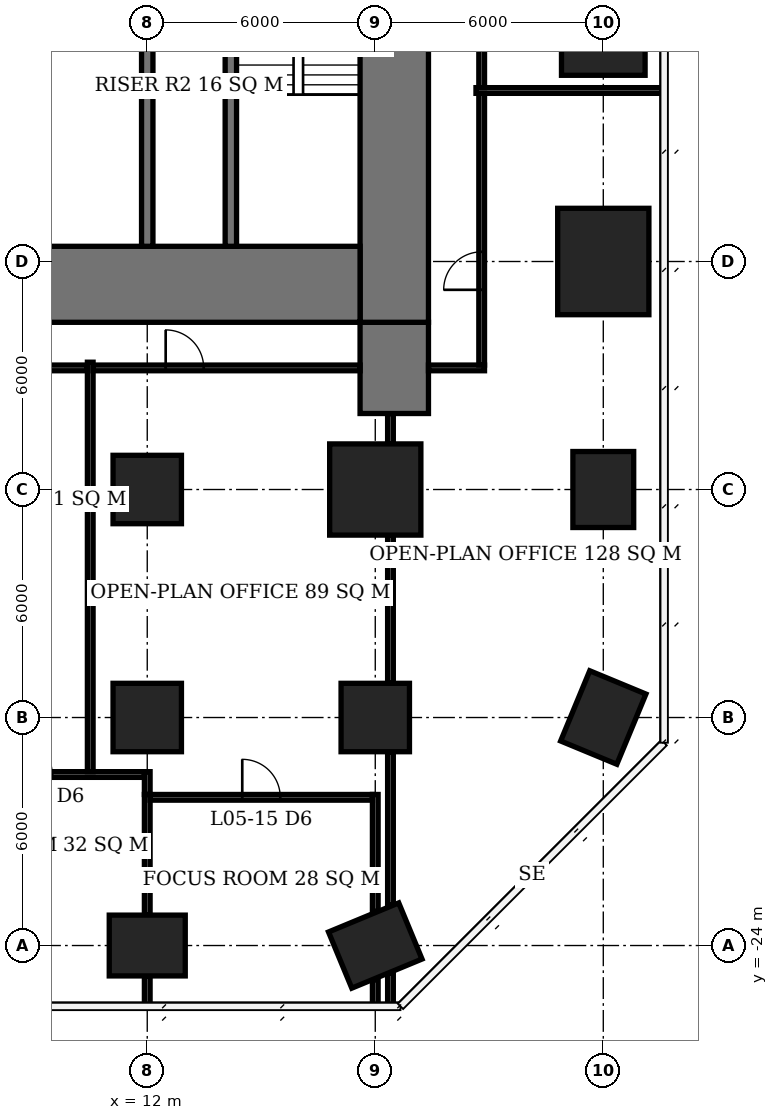
"""IFC4 building model, lengths in metres.
Left out: names, types, materials, properties, quantities, classifications, styles, units other than length and angle.
Written with IfcOpenShell. Run it as: python <this file> out.ifc"""

import sys

from ifc_helpers import new_model, si_unit, direction, frame, frame_2d, origin, origin_2d, place, context, subcontext, project, spatial, rectangle, extrude, element, fill, save


model = new_model("IFC4")
c1 = context("Model", 3, precision=1e-05, world=origin(), true_north=direction((0.0, 1.0)))
c2 = subcontext(c1, "Body", "Model", "MODEL_VIEW")
j1 = project(units=[si_unit("LENGTHUNIT", "METRE"), si_unit("PLANEANGLEUNIT", "RADIAN")], contexts=[c1])
p1 = place(None, origin())
s1 = spatial("IfcSite", under=j1, at=p1, CompositionType="ELEMENT")
p2 = place(p1, origin())
s2 = spatial("IfcBuilding", under=s1, at=p2, CompositionType="ELEMENT")
p3 = place(p2, frame((0.0, 0.0, 26.0)))
s3 = spatial("IfcBuildingStorey", under=s2, at=p3, CompositionType="ELEMENT", Elevation=26.0)
p4 = place(p3, frame((12.0, -24.0, 0.0), z_axis=(0.0, 0.0, 1.0), x_axis=(1.0, 0.0, 0.0)))
e1 = element("IfcColumn", 1, at=p4, inside=s3, PredefinedType="COLUMN", context=c2, shape_type="SweptSolid", body=[
    extrude(rectangle(XDim=2.0, YDim=1.6, at=origin_2d()), origin(), (0.0, 0.0, 1.0), 3.9),
])
for number, where, z_axis, x_axis in (
    (2, (12.0, -18.0, 0.0), (0.0, 0.0, 1.0), (1.0, 0.0, 0.0)),
    (3, (12.0, -12.0, 0.0), (0.0, 0.0, 1.0), (1.0, 0.0, 0.0)),
):
    element("IfcColumn", number, at=place(p3, frame(where, z_axis=z_axis, x_axis=x_axis)), inside=s3, PredefinedType="COLUMN", context=c2, shape_type="SweptSolid", body=[
        extrude(rectangle(XDim=1.8, YDim=1.8, at=origin_2d()), origin(), (0.0, 0.0, 1.0), 3.9),
    ])
p5 = place(p3, frame((18.0, -24.0, 0.0), z_axis=(0.0, 0.0, 1.0), x_axis=(-0.923879532511, -0.382683432365, 0.0)))
e4 = element("IfcColumn", 4, at=p5, inside=s3, PredefinedType="COLUMN", context=c2, shape_type="SweptSolid", body=[
    extrude(rectangle(XDim=2.0, YDim=1.6, at=origin_2d()), origin(), (0.0, 0.0, 1.0), 3.9),
])
p6 = place(p3, frame((18.0, -18.0, 0.0), z_axis=(0.0, 0.0, 1.0), x_axis=(1.0, 0.0, 0.0)))
e5 = element("IfcColumn", 5, at=p6, inside=s3, PredefinedType="COLUMN", context=c2, shape_type="SweptSolid", body=[
    extrude(rectangle(XDim=1.8, YDim=1.8, at=origin_2d()), origin(), (0.0, 0.0, 1.0), 3.9),
])
p7 = place(p3, frame((18.0, -12.0, 0.0), z_axis=(0.0, 0.0, 1.0), x_axis=(1.0, 0.0, 0.0)))
e6 = element("IfcColumn", 6, at=p7, inside=s3, PredefinedType="COLUMN", context=c2, shape_type="SweptSolid", body=[
    extrude(rectangle(XDim=2.4, YDim=2.4, at=origin_2d()), origin(), (0.0, 0.0, 1.0), 3.9),
])
for number, where, z_axis, x_axis in (
    (7, (24.0, -18.0, 0.0), (0.0, 0.0, 1.0), (-0.383, -0.924, 0.0)),
    (8, (24.0, -12.0, 0.0), (0.0, 0.0, 1.0), (0.0, 1.0, 0.0)),
):
    element("IfcColumn", number, at=place(p3, frame(where, z_axis=z_axis, x_axis=x_axis)), inside=s3, PredefinedType="COLUMN", context=c2, shape_type="SweptSolid", body=[
        extrude(rectangle(XDim=2.0, YDim=1.6, at=origin_2d()), origin(), (0.0, 0.0, 1.0), 3.9),
    ])
p8 = place(p3, frame((24.0, -6.0, 0.0), z_axis=(0.0, 0.0, 1.0), x_axis=(0.0, 1.0, 0.0)))
e9 = element("IfcColumn", 9, at=p8, inside=s3, PredefinedType="COLUMN", context=c2, shape_type="SweptSolid", body=[
    extrude(rectangle(XDim=2.8, YDim=2.4, at=origin_2d()), origin(), (0.0, 0.0, 1.0), 3.9),
])
p9 = place(p3, frame((24.0, 0.0, 0.0), z_axis=(0.0, 0.0, 1.0), x_axis=(1.0, 0.0, 0.0)))
e10 = element("IfcColumn", 10, at=p9, inside=s3, PredefinedType="COLUMN", context=c2, shape_type="SweptSolid", body=[
    extrude(rectangle(XDim=2.2, YDim=2.2, at=origin_2d()), origin(), (0.0, 0.0, 1.0), 3.9),
])
p10 = place(p3, frame((-5.6, -6.6, 0.0), z_axis=(0.0, 0.0, 1.0), x_axis=(1.0, 0.0, 0.0)))
e11 = element("IfcWall", 11, at=p10, inside=s3, PredefinedType="SHEAR", context=c2, shape_type="SweptSolid", body=[
    extrude(rectangle(XDim=23.2, YDim=2.0, at=frame_2d((11.6, 0.0))), origin(), (0.0, 0.0, 1.0), 3.9),
])
p11 = place(p3, frame((18.5, -7.6, 0.0), z_axis=(0.0, 0.0, 1.0), x_axis=(0.0, 1.0, 0.0)))
e12 = element("IfcWall", 12, at=p11, inside=s3, PredefinedType="SHEAR", context=c2, shape_type="SweptSolid", body=[
    extrude(rectangle(XDim=21.2, YDim=1.8, at=frame_2d((10.6, 0.0))), origin(), (0.0, 0.0, 1.0), 3.9),
])
p12 = place(p11, frame((9.2, 0.0, 0.0)))
e13 = element("IfcOpeningElement", 13, at=p12, cuts=e12, PredefinedType="OPENING", context=c2, shape_type="SweptSolid", body=[
    extrude(rectangle(XDim=1.8, YDim=2.4, at=frame_2d((0.9, 1.2))), frame((0.0, 0.91, 0.0), z_axis=(0.0, -1.0, 0.0), x_axis=(1.0, 0.0, 0.0)), (0.0, 0.0, 1.0), 1.82),
])
p13 = place(p3, frame((18.5, -10.0, 0.0), z_axis=(0.0, 0.0, 1.0), x_axis=(0.0, 1.0, 0.0)))
e14 = element("IfcWall", 14, at=p13, inside=s3, PredefinedType="SHEAR", context=c2, shape_type="SweptSolid", body=[
    extrude(rectangle(XDim=2.4, YDim=1.8, at=frame_2d((1.2, 0.0))), origin(), (0.0, 0.0, 1.0), 3.9),
])
p14 = place(p3, frame((12.0, -5.6, 0.0), z_axis=(0.0, 0.0, 1.0), x_axis=(0.0, 1.0, 0.0)))
e15 = element("IfcWall", 15, at=p14, inside=s3, PredefinedType="SHEAR", context=c2, shape_type="SweptSolid", body=[
    extrude(rectangle(XDim=5.45, YDim=0.3, at=frame_2d((2.725, 0.0))), origin(), (0.0, 0.0, 1.0), 3.9),
])
p15 = place(p3, frame((14.2, -5.6, 0.0), z_axis=(0.0, 0.0, 1.0), x_axis=(0.0, 1.0, 0.0)))
e16 = element("IfcWall", 16, at=p15, inside=s3, PredefinedType="SHEAR", context=c2, shape_type="SweptSolid", body=[
    extrude(rectangle(XDim=8.45, YDim=0.3, at=frame_2d((4.225, 0.0))), origin(), (0.0, 0.0, 1.0), 3.9),
])
p16 = place(p3, frame((12.075, -20.1, 0.0), z_axis=(0.0, 0.0, 1.0), x_axis=(1.0, 0.0, 0.0)))
e17 = element("IfcWall", 17, at=p16, inside=s3, PredefinedType="PARTITIONING", context=c2, shape_type="SweptSolid", body=[
    extrude(rectangle(XDim=5.85, YDim=0.15, at=frame_2d((2.925, 0.0))), origin(), (0.0, 0.0, 1.0), 3.65),
])
p17 = place(p16, frame((2.425, 0.0, 0.0)))
e18 = element("IfcOpeningElement", 18, at=p17, cuts=e17, PredefinedType="OPENING", context=c2, shape_type="SweptSolid", body=[
    extrude(rectangle(XDim=1.0, YDim=2.1, at=frame_2d((0.5, 1.05))), frame((0.0, 0.085, 0.0), z_axis=(0.0, -1.0, 0.0), x_axis=(1.0, 0.0, 0.0)), (0.0, 0.0, 1.0), 0.17),
])
p18 = place(p3, frame((6.075, -19.5, 0.0), z_axis=(0.0, 0.0, 1.0), x_axis=(1.0, 0.0, 0.0)))
e19 = element("IfcWall", 19, at=p18, inside=s3, PredefinedType="PARTITIONING", context=c2, shape_type="SweptSolid", body=[
    extrude(rectangle(XDim=5.85, YDim=0.15, at=frame_2d((2.925, 0.0))), origin(), (0.0, 0.0, 1.0), 3.65),
])
p19 = place(p18, frame((2.425, 0.0, 0.0)))
e20 = element("IfcOpeningElement", 20, at=p19, cuts=e19, PredefinedType="OPENING", context=c2, shape_type="SweptSolid", body=[
    extrude(rectangle(XDim=1.0, YDim=2.1, at=frame_2d((0.5, 1.05))), frame((0.0, 0.085, 0.0), z_axis=(0.0, -1.0, 0.0), x_axis=(1.0, 0.0, 0.0)), (0.0, 0.0, 1.0), 0.17),
])
p20 = place(p3, frame((12.0, -25.6, 0.0), z_axis=(0.0, 0.0, 1.0), x_axis=(0.0, 1.0, 0.0)))
e21 = element("IfcWall", 21, at=p20, inside=s3, PredefinedType="PARTITIONING", context=c2, shape_type="SweptSolid", body=[
    extrude(rectangle(XDim=0.8, YDim=0.15, at=frame_2d((0.4, 0.0))), origin(), (0.0, 0.0, 1.0), 3.65),
])
p21 = place(p3, frame((12.0, -23.2, 0.0), z_axis=(0.0, 0.0, 1.0), x_axis=(0.0, 1.0, 0.0)))
e22 = element("IfcWall", 22, at=p21, inside=s3, PredefinedType="PARTITIONING", context=c2, shape_type="SweptSolid", body=[
    extrude(rectangle(XDim=3.175, YDim=0.15, at=frame_2d((1.587, 0.0))), origin(), (0.0, 0.0, 1.0), 3.65),
])
p22 = place(p3, frame((12.0, -20.025, 0.0), z_axis=(0.0, 0.0, 1.0), x_axis=(0.0, 1.0, 0.0)))
e23 = element("IfcWall", 23, at=p22, inside=s3, PredefinedType="PARTITIONING", context=c2, shape_type="SweptSolid", body=[
    extrude(rectangle(XDim=0.6, YDim=0.15, at=frame_2d((0.3, 0.0))), origin(), (0.0, 0.0, 1.0), 3.65),
])
p23 = place(p3, frame((18.0, -25.6, 0.0), z_axis=(0.0, 0.0, 1.0), x_axis=(0.0, 1.0, 0.0)))
e24 = element("IfcWall", 24, at=p23, inside=s3, PredefinedType="PARTITIONING", context=c2, shape_type="SweptSolid", body=[
    extrude(rectangle(XDim=0.703, YDim=0.15, at=frame_2d((0.352, 0.0))), origin(), (0.0, 0.0, 1.0), 3.65),
])
p24 = place(p3, frame((18.0, -23.103, 0.0), z_axis=(0.0, 0.0, 1.0), x_axis=(0.0, 1.0, 0.0)))
e25 = element("IfcWall", 25, at=p24, inside=s3, PredefinedType="PARTITIONING", context=c2, shape_type="SweptSolid", body=[
    extrude(rectangle(XDim=3.078, YDim=0.15, at=frame_2d((1.539, 0.0))), origin(), (0.0, 0.0, 1.0), 3.65),
])
p25 = place(p3, frame((4.575, -8.8, 0.0), z_axis=(0.0, 0.0, 1.0), x_axis=(1.0, 0.0, 0.0)))
e26 = element("IfcWall", 26, at=p25, inside=s3, PredefinedType="PARTITIONING", context=c2, shape_type="SweptSolid", body=[
    extrude(rectangle(XDim=5.85, YDim=0.15, at=frame_2d((2.925, 0.0))), origin(), (0.0, 0.0, 1.0), 3.65),
])
p26 = place(p25, frame((1.525, 0.0, 0.0)))
e27 = element("IfcOpeningElement", 27, at=p26, cuts=e26, PredefinedType="OPENING", context=c2, shape_type="SweptSolid", body=[
    extrude(rectangle(XDim=1.0, YDim=2.1, at=frame_2d((0.5, 1.05))), frame((0.0, 0.085, 0.0), z_axis=(0.0, -1.0, 0.0), x_axis=(1.0, 0.0, 0.0)), (0.0, 0.0, 1.0), 0.17),
])
p27 = place(p3, frame((10.5, -19.425, 0.0), z_axis=(0.0, 0.0, 1.0), x_axis=(0.0, 1.0, 0.0)))
e28 = element("IfcWall", 28, at=p27, inside=s3, PredefinedType="PARTITIONING", context=c2, shape_type="SweptSolid", body=[
    extrude(rectangle(XDim=10.775, YDim=0.15, at=frame_2d((5.388, 0.0))), origin(), (0.0, 0.0, 1.0), 3.65),
])
p28 = place(p3, frame((10.575, -8.8, 0.0), z_axis=(0.0, 0.0, 1.0), x_axis=(1.0, 0.0, 0.0)))
e29 = element("IfcWall", 29, at=p28, inside=s3, PredefinedType="PARTITIONING", context=c2, shape_type="SweptSolid", body=[
    extrude(rectangle(XDim=7.025, YDim=0.15, at=frame_2d((3.513, 0.0))), origin(), (0.0, 0.0, 1.0), 3.65),
])
p29 = place(p28, frame((1.91, 0.0, 0.0)))
e30 = element("IfcOpeningElement", 30, at=p29, cuts=e29, PredefinedType="OPENING", context=c2, shape_type="SweptSolid", body=[
    extrude(rectangle(XDim=1.0, YDim=2.1, at=frame_2d((0.5, 1.05))), frame((0.0, 0.085, 0.0), z_axis=(0.0, -1.0, 0.0), x_axis=(1.0, 0.0, 0.0)), (0.0, 0.0, 1.0), 0.17),
])
p30 = place(p3, frame((18.4, -25.6, 0.0), z_axis=(0.0, 0.0, 1.0), x_axis=(0.0, 1.0, 0.0)))
e31 = element("IfcWall", 31, at=p30, inside=s3, PredefinedType="PARTITIONING", context=c2, shape_type="SweptSolid", body=[
    extrude(rectangle(XDim=0.869, YDim=0.15, at=frame_2d((0.435, 0.0))), origin(), (0.0, 0.0, 1.0), 3.65),
])
p31 = place(p3, frame((18.4, -22.937, 0.0), z_axis=(0.0, 0.0, 1.0), x_axis=(0.0, 1.0, 0.0)))
e32 = element("IfcWall", 32, at=p31, inside=s3, PredefinedType="PARTITIONING", context=c2, shape_type="SweptSolid", body=[
    extrude(rectangle(XDim=4.037, YDim=0.15, at=frame_2d((2.019, 0.0))), origin(), (0.0, 0.0, 1.0), 3.65),
])
p32 = place(p3, frame((18.4, -17.1, 0.0), z_axis=(0.0, 0.0, 1.0), x_axis=(0.0, 1.0, 0.0)))
e33 = element("IfcWall", 33, at=p32, inside=s3, PredefinedType="PARTITIONING", context=c2, shape_type="SweptSolid", body=[
    extrude(rectangle(XDim=3.9, YDim=0.15, at=frame_2d((1.95, 0.0))), origin(), (0.0, 0.0, 1.0), 3.65),
])
p33 = place(p3, frame((18.4, -10.8, 0.0), z_axis=(0.0, 0.0, 1.0), x_axis=(0.0, 1.0, 0.0)))
e34 = element("IfcWall", 34, at=p33, inside=s3, PredefinedType="PARTITIONING", context=c2, shape_type="SweptSolid", body=[
    extrude(rectangle(XDim=0.8, YDim=0.15, at=frame_2d((0.4, 0.0))), origin(), (0.0, 0.0, 1.0), 3.65),
])
p34 = place(p3, frame((19.4, -8.8, 0.0), z_axis=(0.0, 0.0, 1.0), x_axis=(1.0, 0.0, 0.0)))
e35 = element("IfcWall", 35, at=p34, inside=s3, PredefinedType="PARTITIONING", context=c2, shape_type="SweptSolid", body=[
    extrude(rectangle(XDim=1.475, YDim=0.15, at=frame_2d((0.738, 0.0))), origin(), (0.0, 0.0, 1.0), 3.65),
])
p35 = place(p3, frame((20.8, -8.725, 0.0), z_axis=(0.0, 0.0, 1.0), x_axis=(0.0, 1.0, 0.0)))
e36 = element("IfcWall", 36, at=p35, inside=s3, PredefinedType="PARTITIONING", context=c2, shape_type="SweptSolid", body=[
    extrude(rectangle(XDim=7.15, YDim=0.15, at=frame_2d((3.575, 0.0))), origin(), (0.0, 0.0, 1.0), 3.65),
])
p36 = place(p35, frame((1.98, 0.0, 0.0)))
e37 = element("IfcOpeningElement", 37, at=p36, cuts=e36, PredefinedType="OPENING", context=c2, shape_type="SweptSolid", body=[
    extrude(rectangle(XDim=1.0, YDim=2.1, at=frame_2d((0.5, 1.05))), frame((0.0, 0.085, 0.0), z_axis=(0.0, -1.0, 0.0), x_axis=(1.0, 0.0, 0.0)), (0.0, 0.0, 1.0), 0.17),
])
p37 = place(p3, frame((20.8, -1.425, 0.0), z_axis=(0.0, 0.0, 1.0), x_axis=(0.0, 1.0, 0.0)))
e38 = element("IfcWall", 38, at=p37, inside=s3, PredefinedType="PARTITIONING", context=c2, shape_type="SweptSolid", body=[
    extrude(rectangle(XDim=16.15, YDim=0.15, at=frame_2d((8.075, 0.0))), origin(), (0.0, 0.0, 1.0), 3.65),
])
p38 = place(p37, frame((10.02, 0.0, 0.0)))
e39 = element("IfcOpeningElement", 39, at=p38, cuts=e38, PredefinedType="OPENING", context=c2, shape_type="SweptSolid", body=[
    extrude(rectangle(XDim=1.0, YDim=2.1, at=frame_2d((0.5, 1.05))), frame((0.0, 0.085, 0.0), z_axis=(0.0, -1.0, 0.0), x_axis=(1.0, 0.0, 0.0)), (0.0, 0.0, 1.0), 0.17),
])
p39 = place(p3, frame((20.65, -1.5, 0.0), z_axis=(0.0, 0.0, 1.0), x_axis=(1.0, 0.0, 0.0)))
e40 = element("IfcWall", 40, at=p39, inside=s3, PredefinedType="PARTITIONING", context=c2, shape_type="SweptSolid", body=[
    extrude(rectangle(XDim=4.95, YDim=0.15, at=frame_2d((2.475, 0.0))), origin(), (0.0, 0.0, 1.0), 3.65),
])
p40 = place(p17, origin())
e41 = element("IfcDoor", 41, at=p40, inside=s3, OperationType="SINGLE_SWING_LEFT", PredefinedType="DOOR", context=c2, shape_type="SweptSolid", body=[
    extrude(rectangle(XDim=1.0, YDim=2.1, at=frame_2d((0.5, 1.05))), frame((0.0, 0.025, 0.0), z_axis=(0.0, -1.0, 0.0), x_axis=(1.0, 0.0, 0.0)), (0.0, 0.0, 1.0), 0.05),
])
fill(e18, e41)
p41 = place(p29, origin())
e42 = element("IfcDoor", 42, at=p41, inside=s3, OperationType="SINGLE_SWING_LEFT", PredefinedType="DOOR", context=c2, shape_type="SweptSolid", body=[
    extrude(rectangle(XDim=1.0, YDim=2.1, at=frame_2d((0.5, 1.05))), frame((0.0, 0.025, 0.0), z_axis=(0.0, -1.0, 0.0), x_axis=(1.0, 0.0, 0.0)), (0.0, 0.0, 1.0), 0.05),
])
fill(e30, e42)
p42 = place(p36, origin())
e43 = element("IfcDoor", 43, at=p42, inside=s3, OperationType="SINGLE_SWING_LEFT", PredefinedType="DOOR", context=c2, shape_type="SweptSolid", body=[
    extrude(rectangle(XDim=1.0, YDim=2.1, at=frame_2d((0.5, 1.05))), frame((0.0, 0.025, 0.0), z_axis=(0.0, -1.0, 0.0), x_axis=(1.0, 0.0, 0.0)), (0.0, 0.0, 1.0), 0.05),
])
fill(e37, e43)
save(model, sys.argv[1])
